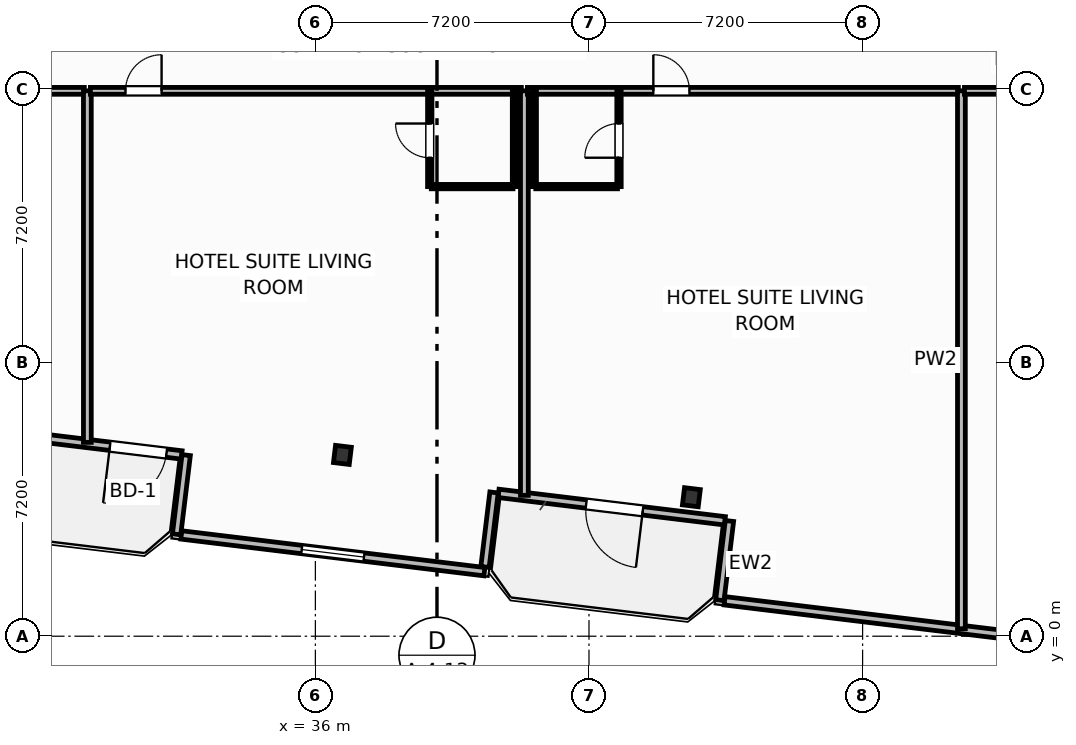
"""IFC4 building model, lengths in metres.
Left out: names, types, materials, properties, quantities, classifications, styles, units other than length and angle.
Written with IfcOpenShell. Run it as: python <this file> out.ifc"""

import sys

from ifc_helpers import new_model, si_unit, direction, frame, frame_2d, origin, origin_2d, place, context, subcontext, project, spatial, rectangle, i_section, extrude, element, fill, save


model = new_model("IFC4")
c1 = context("Model", 3, precision=1e-05, world=origin(), true_north=direction((0.0, 1.0)))
c2 = subcontext(c1, "Body", "Model", "MODEL_VIEW")
j1 = project(units=[si_unit("LENGTHUNIT", "METRE"), si_unit("PLANEANGLEUNIT", "RADIAN")], contexts=[c1])
p1 = place(None, origin())
s1 = spatial("IfcSite", under=j1, at=p1, CompositionType="ELEMENT")
p2 = place(p1, origin())
s2 = spatial("IfcBuilding", under=s1, at=p2, CompositionType="ELEMENT")
p3 = place(p2, frame((0.0, 0.0, 136.5)))
s3 = spatial("IfcBuildingStorey", under=s2, at=p3, CompositionType="ELEMENT", Elevation=136.5)
for number, where, z_axis, x_axis in (
    (1, (36.711, 4.77, 0.0), (0.0, 0.0, 1.0), (0.993, -0.12, 0.0)),
    (2, (45.894, 3.657, 0.0), (0.0, 0.0, 1.0), (0.993, -0.12, 0.0)),
):
    element("IfcColumn", number, at=place(p3, frame(where, z_axis=z_axis, x_axis=x_axis)), inside=s3, PredefinedType="COLUMN", context=c2, shape_type="SweptSolid", body=[
        extrude(i_section(OverallWidth=0.418, OverallDepth=0.455, WebThickness=0.042, FlangeThickness=0.068, FilletRadius=0.025, at=origin_2d()), origin(), (0.0, 0.0, 1.0), 3.7),
    ])
p4 = place(p3, frame((32.48, 4.77, 0.0), z_axis=(0.0, 0.0, 1.0), x_axis=(-0.992735402148, 0.120318000826, 0.0)))
e3 = element("IfcWall", 3, at=p4, inside=s3, PredefinedType="SOLIDWALL", context=c2, shape_type="SweptSolid", body=[
    extrude(rectangle(XDim=6.0, YDim=0.22, at=frame_2d((3.0, 0.0))), origin(), (0.0, 0.0, 1.0), 2.73),
])
p5 = place(p4, frame((0.4, 0.0, 0.0)))
e4 = element("IfcOpeningElement", 4, at=p5, cuts=e3, PredefinedType="OPENING", context=c2, shape_type="SweptSolid", body=[
    extrude(rectangle(XDim=1.5, YDim=2.25, at=frame_2d((0.75, 1.125))), frame((0.0, 0.12, 0.0), z_axis=(0.0, -1.0, 0.0), x_axis=(1.0, 0.0, 0.0)), (0.0, 0.0, 1.0), 0.24),
])
p6 = place(p3, frame((46.776, 3.037, 0.0), z_axis=(0.0, 0.0, 1.0), x_axis=(-0.992735402148, 0.120318000826, 0.0)))
e5 = element("IfcWall", 5, at=p6, inside=s3, PredefinedType="SOLIDWALL", context=c2, shape_type="SweptSolid", body=[
    extrude(rectangle(XDim=6.0, YDim=0.22, at=frame_2d((3.0, 0.0))), origin(), (0.0, 0.0, 1.0), 2.73),
])
p7 = place(p6, frame((2.176, 0.0, 0.0)))
e6 = element("IfcOpeningElement", 6, at=p7, cuts=e5, PredefinedType="OPENING", context=c2, shape_type="SweptSolid", body=[
    extrude(rectangle(XDim=1.5, YDim=2.25, at=frame_2d((0.75, 1.125))), frame((0.0, 0.12, 0.0), z_axis=(0.0, -1.0, 0.0), x_axis=(1.0, 0.0, 0.0)), (0.0, 0.0, 1.0), 0.24),
])
p8 = place(p3, frame((32.601, 4.765, 0.0), z_axis=(0.0, 0.0, 1.0), x_axis=(-0.120327895535, -0.992734202874, 0.0)))
e7 = element("IfcWall", 7, at=p8, inside=s3, PredefinedType="SOLIDWALL", context=c2, shape_type="SweptSolid", body=[
    extrude(rectangle(XDim=2.1, YDim=0.22, at=frame_2d((1.05, 0.0))), origin(), (0.0, 0.0, 1.0), 2.73),
])
p9 = place(p3, frame((32.472, 2.665, 0.0), z_axis=(0.0, 0.0, 1.0), x_axis=(0.992734661931, -0.120324108143, 0.0)))
e8 = element("IfcWall", 8, at=p9, inside=s3, PredefinedType="SOLIDWALL", context=c2, shape_type="SweptSolid", body=[
    extrude(rectangle(XDim=8.035, YDim=0.22, at=frame_2d((4.018, 0.0))), origin(), (0.0, 0.0, 1.0), 2.73),
])
p10 = place(p9, frame((3.192, 0.0, 0.8)))
e9 = element("IfcOpeningElement", 9, at=p10, cuts=e8, PredefinedType="OPENING", context=c2, shape_type="SweptSolid", body=[
    extrude(rectangle(XDim=1.65, YDim=1.65, at=frame_2d((0.825, 0.825))), frame((0.0, 0.12, 0.0), z_axis=(0.0, -1.0, 0.0), x_axis=(1.0, 0.0, 0.0)), (0.0, 0.0, 1.0), 0.24),
])
p11 = place(p3, frame((40.464, 1.822, 0.0), z_axis=(0.0, 0.0, 1.0), x_axis=(0.120275992932, 0.992740492538, 0.0)))
e10 = element("IfcWall", 10, at=p11, inside=s3, PredefinedType="SOLIDWALL", context=c2, shape_type="SweptSolid", body=[
    extrude(rectangle(XDim=1.975, YDim=0.22, at=frame_2d((0.988, 0.0))), origin(), (0.0, 0.0, 1.0), 2.73),
])
p12 = place(p3, frame((46.896, 3.032, 0.0), z_axis=(0.0, 0.0, 1.0), x_axis=(-0.120327895535, -0.992734202874, 0.0)))
e11 = element("IfcWall", 11, at=p12, inside=s3, PredefinedType="SOLIDWALL", context=c2, shape_type="SweptSolid", body=[
    extrude(rectangle(XDim=2.1, YDim=0.22, at=frame_2d((1.05, 0.0))), origin(), (0.0, 0.0, 1.0), 2.73),
])
p13 = place(p3, frame((46.768, 0.932, 0.0), z_axis=(0.0, 0.0, 1.0), x_axis=(0.992733036814, -0.120337515419, 0.0)))
e12 = element("IfcWall", 12, at=p13, inside=s3, PredefinedType="SOLIDWALL", context=c2, shape_type="SweptSolid", body=[
    extrude(rectangle(XDim=21.347, YDim=0.22, at=frame_2d((10.673, 0.0))), origin(), (0.0, 0.0, 1.0), 2.73),
])
p14 = place(p13, frame((9.849, 0.0, 0.8)))
e13 = element("IfcOpeningElement", 13, at=p14, cuts=e12, PredefinedType="OPENING", context=c2, shape_type="SweptSolid", body=[
    extrude(rectangle(XDim=1.65, YDim=1.65, at=frame_2d((0.825, 0.825))), frame((0.0, 0.12, 0.0), z_axis=(0.0, -1.0, 0.0), x_axis=(1.0, 0.0, 0.0)), (0.0, 0.0, 1.0), 0.24),
])
p15 = place(p3, frame((18.58, 14.35, 0.0), z_axis=(0.0, 0.0, 1.0), x_axis=(1.0, 0.0, 0.0)))
e14 = element("IfcWall", 14, at=p15, inside=s3, PredefinedType="PARTITIONING", context=c2, shape_type="SweptSolid", body=[
    extrude(rectangle(XDim=11.34, YDim=0.18, at=frame_2d((5.67, 0.0))), origin(), (0.0, 0.0, 1.0), 3.45),
])
p16 = place(p15, frame((3.313, 0.0, 0.0)))
e15 = element("IfcOpeningElement", 15, at=p16, cuts=e14, PredefinedType="OPENING", context=c2, shape_type="SweptSolid", body=[
    extrude(rectangle(XDim=0.95, YDim=2.15, at=frame_2d((0.475, 1.075))), frame((0.0, 0.1, 0.0), z_axis=(0.0, -1.0, 0.0), x_axis=(1.0, 0.0, 0.0)), (0.0, 0.0, 1.0), 0.2),
])
p17 = place(p3, frame((30.0, 5.1, 0.0), z_axis=(0.0, 0.0, 1.0), x_axis=(0.0, 1.0, 0.0)))
e16 = element("IfcWall", 16, at=p17, inside=s3, PredefinedType="PARTITIONING", context=c2, shape_type="SweptSolid", body=[
    extrude(rectangle(XDim=9.25, YDim=0.205, at=frame_2d((4.625, 0.0))), origin(), (0.0, 0.0, 1.0), 3.45),
])
p18 = place(p3, frame((30.08, 14.35, 0.0), z_axis=(0.0, 0.0, 1.0), x_axis=(1.0, 0.0, 0.0)))
e17 = element("IfcWall", 17, at=p18, inside=s3, PredefinedType="PARTITIONING", context=c2, shape_type="SweptSolid", body=[
    extrude(rectangle(XDim=11.34, YDim=0.18, at=frame_2d((5.67, 0.0))), origin(), (0.0, 0.0, 1.0), 3.45),
])
p19 = place(p18, frame((0.923, 0.0, 0.0)))
e18 = element("IfcOpeningElement", 18, at=p19, cuts=e17, PredefinedType="OPENING", context=c2, shape_type="SweptSolid", body=[
    extrude(rectangle(XDim=0.95, YDim=2.15, at=frame_2d((0.475, 1.075))), frame((0.0, 0.1, 0.0), z_axis=(0.0, -1.0, 0.0), x_axis=(1.0, 0.0, 0.0)), (0.0, 0.0, 1.0), 0.2),
])
p20 = place(p3, frame((39.05, 11.83, 0.0), z_axis=(0.0, 0.0, 1.0), x_axis=(1.0, 0.0, 0.0)))
e19 = element("IfcWall", 19, at=p20, inside=s3, PredefinedType="PARTITIONING", context=c2, shape_type="SweptSolid", body=[
    extrude(rectangle(XDim=2.15, YDim=0.115, at=frame_2d((1.075, 0.0))), origin(), (0.0, 0.0, 1.0), 3.45),
])
p21 = place(p3, frame((39.01, 11.83, 0.0), z_axis=(0.0, 0.0, 1.0), x_axis=(0.0, 1.0, 0.0)))
e20 = element("IfcWall", 20, at=p21, inside=s3, PredefinedType="PARTITIONING", context=c2, shape_type="SweptSolid", body=[
    extrude(rectangle(XDim=2.52, YDim=0.115, at=frame_2d((1.26, 0.0))), origin(), (0.0, 0.0, 1.0), 3.45),
])
p22 = place(p21, frame((0.76, 0.0, 0.0)))
e21 = element("IfcOpeningElement", 21, at=p22, cuts=e20, PredefinedType="OPENING", context=c2, shape_type="SweptSolid", body=[
    extrude(rectangle(XDim=0.9, YDim=2.05, at=frame_2d((0.45, 1.025))), frame((0.0, 0.067, 0.0), z_axis=(0.0, -1.0, 0.0), x_axis=(1.0, 0.0, 0.0)), (0.0, 0.0, 1.0), 0.135),
])
p23 = place(p3, frame((41.24, 11.83, 0.0), z_axis=(0.0, 0.0, 1.0), x_axis=(0.0, 1.0, 0.0)))
e22 = element("IfcWall", 22, at=p23, inside=s3, PredefinedType="PARTITIONING", context=c2, shape_type="SweptSolid", body=[
    extrude(rectangle(XDim=2.52, YDim=0.115, at=frame_2d((1.26, 0.0))), origin(), (0.0, 0.0, 1.0), 3.45),
])
p24 = place(p3, frame((41.5, 3.706, 0.0), z_axis=(0.0, 0.0, 1.0), x_axis=(0.0, 1.0, 0.0)))
e23 = element("IfcWall", 23, at=p24, inside=s3, PredefinedType="PARTITIONING", context=c2, shape_type="SweptSolid", body=[
    extrude(rectangle(XDim=10.644, YDim=0.205, at=frame_2d((5.322, 0.0))), origin(), (0.0, 0.0, 1.0), 3.45),
])
p25 = place(p3, frame((41.58, 14.35, 0.0), z_axis=(0.0, 0.0, 1.0), x_axis=(1.0, 0.0, 0.0)))
e24 = element("IfcWall", 24, at=p25, inside=s3, PredefinedType="PARTITIONING", context=c2, shape_type="SweptSolid", body=[
    extrude(rectangle(XDim=11.34, YDim=0.18, at=frame_2d((5.67, 0.0))), origin(), (0.0, 0.0, 1.0), 3.45),
])
p26 = place(p25, frame((3.313, 0.0, 0.0)))
e25 = element("IfcOpeningElement", 25, at=p26, cuts=e24, PredefinedType="OPENING", context=c2, shape_type="SweptSolid", body=[
    extrude(rectangle(XDim=0.95, YDim=2.15, at=frame_2d((0.475, 1.075))), frame((0.0, 0.1, 0.0), z_axis=(0.0, -1.0, 0.0), x_axis=(1.0, 0.0, 0.0)), (0.0, 0.0, 1.0), 0.2),
])
p27 = place(p3, frame((41.8, 11.83, 0.0), z_axis=(0.0, 0.0, 1.0), x_axis=(1.0, 0.0, 0.0)))
e26 = element("IfcWall", 26, at=p27, inside=s3, PredefinedType="PARTITIONING", context=c2, shape_type="SweptSolid", body=[
    extrude(rectangle(XDim=2.15, YDim=0.115, at=frame_2d((1.075, 0.0))), origin(), (0.0, 0.0, 1.0), 3.45),
])
p28 = place(p3, frame((43.99, 11.83, 0.0), z_axis=(0.0, 0.0, 1.0), x_axis=(0.0, 1.0, 0.0)))
e27 = element("IfcWall", 27, at=p28, inside=s3, PredefinedType="PARTITIONING", context=c2, shape_type="SweptSolid", body=[
    extrude(rectangle(XDim=2.52, YDim=0.115, at=frame_2d((1.26, 0.0))), origin(), (0.0, 0.0, 1.0), 3.45),
])
p29 = place(p28, frame((0.76, 0.0, 0.0)))
e28 = element("IfcOpeningElement", 28, at=p29, cuts=e27, PredefinedType="OPENING", context=c2, shape_type="SweptSolid", body=[
    extrude(rectangle(XDim=0.9, YDim=2.05, at=frame_2d((0.45, 1.025))), frame((0.0, 0.067, 0.0), z_axis=(0.0, -1.0, 0.0), x_axis=(1.0, 0.0, 0.0)), (0.0, 0.0, 1.0), 0.135),
])
p30 = place(p3, frame((41.76, 11.83, 0.0), z_axis=(0.0, 0.0, 1.0), x_axis=(0.0, 1.0, 0.0)))
e29 = element("IfcWall", 29, at=p30, inside=s3, PredefinedType="PARTITIONING", context=c2, shape_type="SweptSolid", body=[
    extrude(rectangle(XDim=2.52, YDim=0.115, at=frame_2d((1.26, 0.0))), origin(), (0.0, 0.0, 1.0), 3.45),
])
p31 = place(p3, frame((53.0, 0.197, 0.0), z_axis=(0.0, 0.0, 1.0), x_axis=(0.0, 1.0, 0.0)))
e30 = element("IfcWall", 30, at=p31, inside=s3, PredefinedType="PARTITIONING", context=c2, shape_type="SweptSolid", body=[
    extrude(rectangle(XDim=14.153, YDim=0.205, at=frame_2d((7.077, 0.0))), origin(), (0.0, 0.0, 1.0), 3.45),
])
p32 = place(p3, frame((53.08, 14.35, 0.0), z_axis=(0.0, 0.0, 1.0), x_axis=(1.0, 0.0, 0.0)))
e31 = element("IfcWall", 31, at=p32, inside=s3, PredefinedType="PARTITIONING", context=c2, shape_type="SweptSolid", body=[
    extrude(rectangle(XDim=22.084, YDim=0.18, at=frame_2d((11.042, 0.0))), origin(), (0.0, 0.0, 1.0), 3.45),
])
p33 = place(p32, frame((0.937, 0.0, 0.0)))
e32 = element("IfcOpeningElement", 32, at=p33, cuts=e31, PredefinedType="OPENING", context=c2, shape_type="SweptSolid", body=[
    extrude(rectangle(XDim=0.95, YDim=2.15, at=frame_2d((0.475, 1.075))), frame((0.0, 0.1, 0.0), z_axis=(0.0, -1.0, 0.0), x_axis=(1.0, 0.0, 0.0)), (0.0, 0.0, 1.0), 0.2),
])
p34 = place(p5, origin())
e33 = element("IfcDoor", 33, at=p34, inside=s3, OperationType="SINGLE_SWING_RIGHT", PredefinedType="DOOR", context=c2, shape_type="SweptSolid", body=[
    extrude(rectangle(XDim=1.5, YDim=2.25, at=frame_2d((0.75, 1.125))), frame((0.0, 0.025, 0.0), z_axis=(0.0, -1.0, 0.0), x_axis=(1.0, 0.0, 0.0)), (0.0, 0.0, 1.0), 0.05),
])
fill(e4, e33)
p35 = place(p7, origin())
e34 = element("IfcDoor", 34, at=p35, inside=s3, OperationType="SINGLE_SWING_LEFT", PredefinedType="DOOR", context=c2, shape_type="SweptSolid", body=[
    extrude(rectangle(XDim=1.5, YDim=2.25, at=frame_2d((0.75, 1.125))), frame((0.0, 0.025, 0.0), z_axis=(0.0, -1.0, 0.0), x_axis=(1.0, 0.0, 0.0)), (0.0, 0.0, 1.0), 0.05),
])
fill(e6, e34)
p36 = place(p10, origin())
e35 = element("IfcWindow", 35, at=p36, inside=s3, PartitioningType="SINGLE_PANEL", PredefinedType="WINDOW", context=c2, shape_type="SweptSolid", body=[
    extrude(rectangle(XDim=1.65, YDim=1.65, at=frame_2d((0.825, 0.825))), frame((0.0, 0.03, 0.0), z_axis=(0.0, -1.0, 0.0), x_axis=(1.0, 0.0, 0.0)), (0.0, 0.0, 1.0), 0.06),
])
fill(e9, e35)
p37 = place(p19, origin())
e36 = element("IfcDoor", 36, at=p37, inside=s3, OperationType="SINGLE_SWING_RIGHT", PredefinedType="DOOR", context=c2, shape_type="SweptSolid", body=[
    extrude(rectangle(XDim=0.95, YDim=2.15, at=frame_2d((0.475, 1.075))), frame((0.0, 0.025, 0.0), z_axis=(0.0, -1.0, 0.0), x_axis=(1.0, 0.0, 0.0)), (0.0, 0.0, 1.0), 0.05),
])
fill(e18, e36)
p38 = place(p22, origin())
e37 = element("IfcDoor", 37, at=p38, inside=s3, OperationType="SINGLE_SWING_RIGHT", PredefinedType="DOOR", context=c2, shape_type="SweptSolid", body=[
    extrude(rectangle(XDim=0.9, YDim=2.05, at=frame_2d((0.45, 1.025))), frame((0.0, 0.025, 0.0), z_axis=(0.0, -1.0, 0.0), x_axis=(1.0, 0.0, 0.0)), (0.0, 0.0, 1.0), 0.05),
])
fill(e21, e37)
p39 = place(p26, origin())
e38 = element("IfcDoor", 38, at=p39, inside=s3, OperationType="SINGLE_SWING_LEFT", PredefinedType="DOOR", context=c2, shape_type="SweptSolid", body=[
    extrude(rectangle(XDim=0.95, YDim=2.15, at=frame_2d((0.475, 1.075))), frame((0.0, 0.025, 0.0), z_axis=(0.0, -1.0, 0.0), x_axis=(1.0, 0.0, 0.0)), (0.0, 0.0, 1.0), 0.05),
])
fill(e25, e38)
p40 = place(p29, origin())
e39 = element("IfcDoor", 39, at=p40, inside=s3, OperationType="SINGLE_SWING_LEFT", PredefinedType="DOOR", context=c2, shape_type="SweptSolid", body=[
    extrude(rectangle(XDim=0.9, YDim=2.05, at=frame_2d((0.45, 1.025))), frame((0.0, 0.025, 0.0), z_axis=(0.0, -1.0, 0.0), x_axis=(1.0, 0.0, 0.0)), (0.0, 0.0, 1.0), 0.05),
])
fill(e28, e39)
save(model, sys.argv[1])
